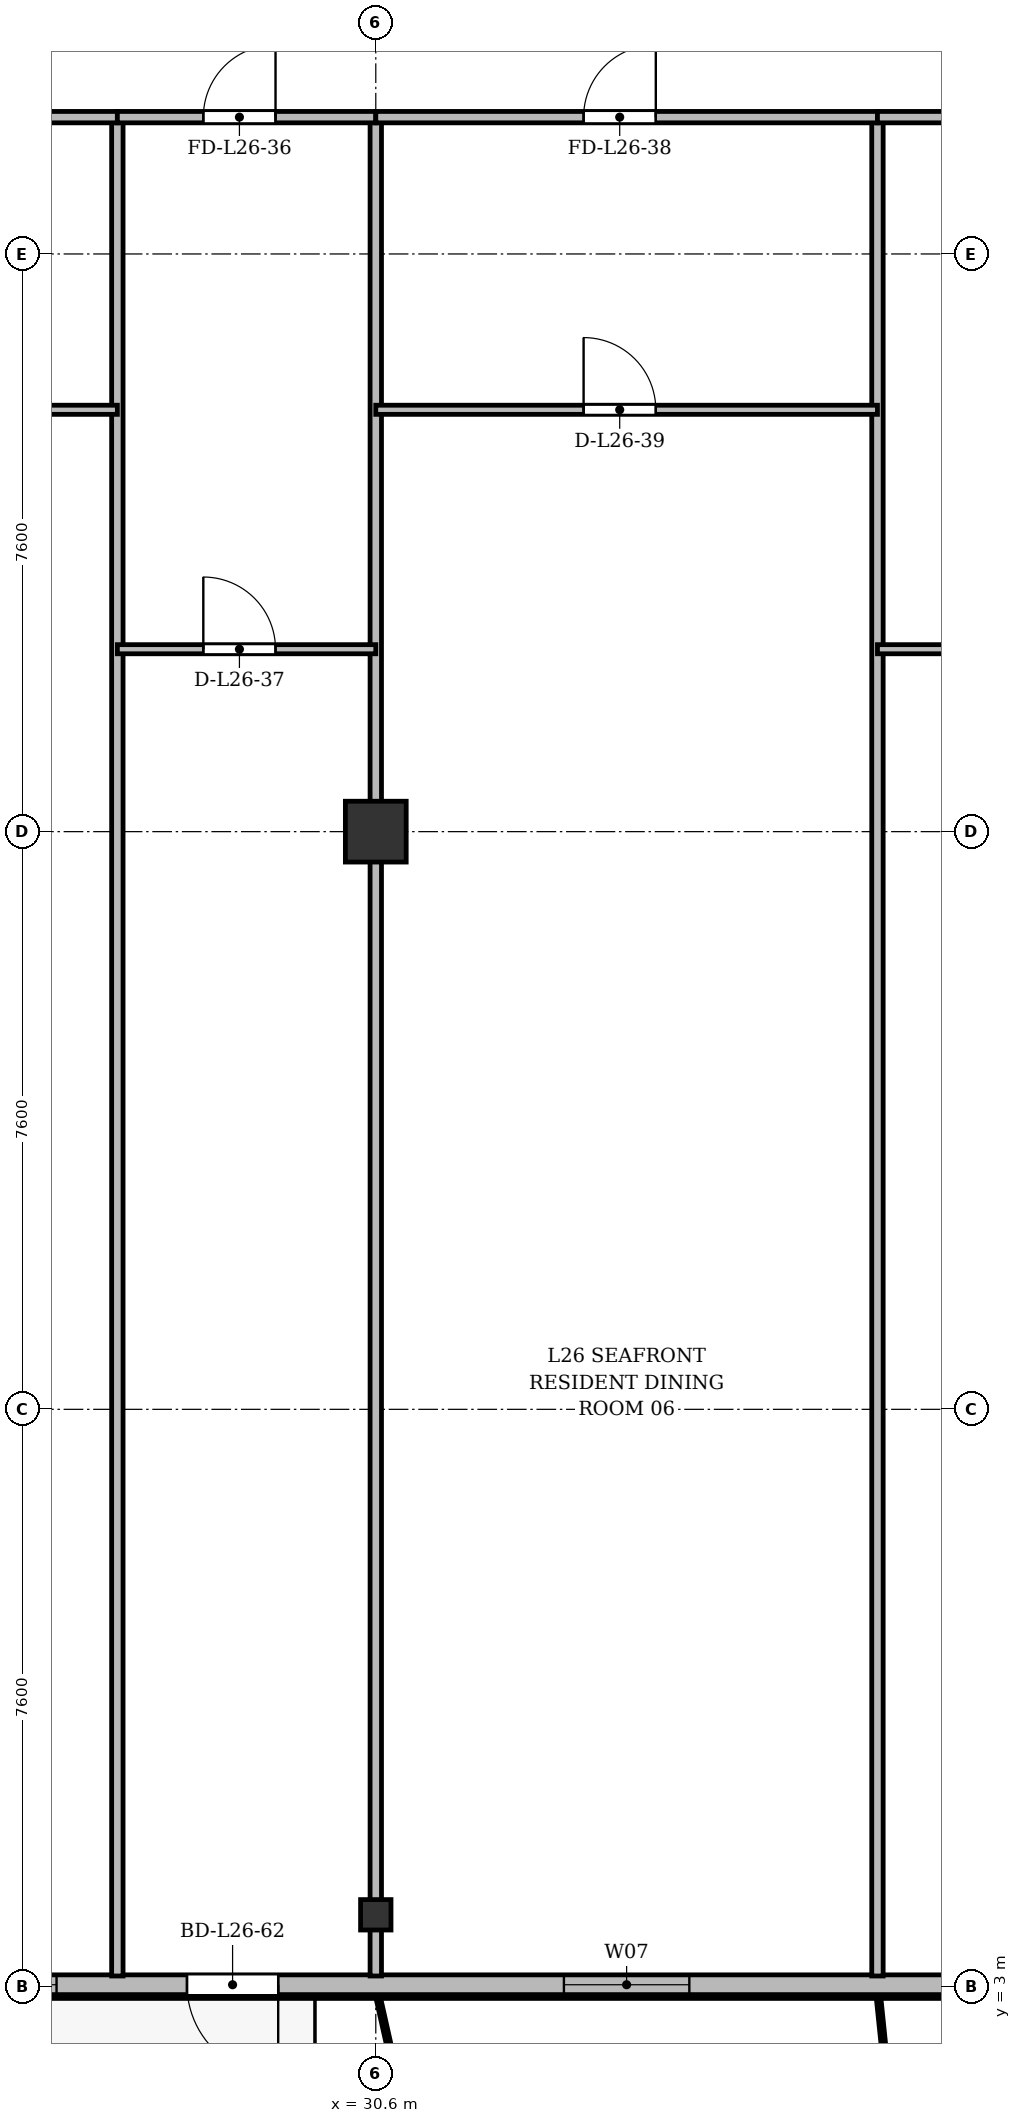
"""IFC4 building model, lengths in metres.
Left out: names, types, materials, properties, quantities, classifications, styles, units other than length and angle.
Written with IfcOpenShell. Run it as: python <this file> out.ifc"""

import sys

from ifc_helpers import new_model, si_unit, direction, frame, frame_2d, origin, origin_2d, place, context, subcontext, project, spatial, rectangle, i_section, extrude, source, transform, mapped, element, fill, save


model = new_model("IFC4")
c1 = context("Model", 3, precision=1e-05, world=origin(), true_north=direction((0.0, 1.0)))
c2 = subcontext(c1, "Body", "Model", "MODEL_VIEW")
j1 = project(units=[si_unit("LENGTHUNIT", "METRE"), si_unit("PLANEANGLEUNIT", "RADIAN")], contexts=[c1])
p1 = place(None, origin())
s1 = spatial("IfcSite", under=j1, at=p1, CompositionType="ELEMENT")
p2 = place(p1, origin())
s2 = spatial("IfcBuilding", under=s1, at=p2, CompositionType="ELEMENT")
p3 = place(p2, frame((0.0, 0.0, 103.3)))
s3 = spatial("IfcBuildingStorey", under=s2, at=p3, CompositionType="ELEMENT", Elevation=103.3)
m1 = source(origin(), c2, "Body", "SweptSolid", [
    extrude(i_section(OverallWidth=0.4, OverallDepth=0.4, WebThickness=0.022, FlangeThickness=0.035, at=origin_2d()), origin(), (0.0, 0.0, 1.0), 3.6),
])
p4 = place(p3, frame((30.6, 3.95, 0.0), z_axis=(0.0, 0.0, 1.0), x_axis=(1.0, 0.0, 0.0)))
e1 = element("IfcColumn", 1, at=p4, inside=s3, PredefinedType="COLUMN", context=c2, shape_type="MappedRepresentation", body=[
    mapped(m1, transform((0.0, 0.0, 0.0), x_axis=(1.0, 0.0, 0.0), y_axis=(0.0, 1.0, 0.0), z_axis=(0.0, 0.0, 1.0), scale=1.0)),
])
m2 = source(origin(), c2, "Body", "SweptSolid", [
    extrude(rectangle(XDim=0.8, YDim=0.8, at=origin_2d()), origin(), (0.0, 0.0, 1.0), 3.6),
])
p5 = place(p3, frame((30.6, 18.2, 0.0), z_axis=(0.0, 0.0, 1.0), x_axis=(1.0, 0.0, 0.0)))
e2 = element("IfcColumn", 2, at=p5, inside=s3, PredefinedType="COLUMN", context=c2, shape_type="MappedRepresentation", body=[
    mapped(m2, transform((0.0, 0.0, 0.0), x_axis=(1.0, 0.0, 0.0), y_axis=(0.0, 1.0, 0.0), z_axis=(0.0, 0.0, 1.0), scale=1.0)),
])
p6 = place(p3, frame((66.9, 3.03, 0.0), z_axis=(0.0, 0.0, 1.0), x_axis=(-1.0, 0.0, 0.0)))
e3 = element("IfcWall", 3, at=p6, inside=s3, PredefinedType="SOLIDWALL", context=c2, shape_type="SweptSolid", body=[
    extrude(rectangle(XDim=59.4, YDim=0.26, at=frame_2d((29.7, 0.0))), origin(), (0.0, 0.0, 1.0), 3.34),
])
p7 = place(p6, frame((2.25, 0.0, 0.9)))
e4 = element("IfcOpeningElement", 4, at=p7, cuts=e3, PredefinedType="OPENING", context=c2, shape_type="SweptSolid", body=[
    extrude(rectangle(XDim=1.5, YDim=1.75, at=frame_2d((0.75, 0.875))), frame((0.0, 0.14, 0.0), z_axis=(0.0, -1.0, 0.0), x_axis=(1.0, 0.0, 0.0)), (0.0, 0.0, 1.0), 0.28),
])
p8 = place(p6, frame((5.4, 0.0, 0.9)))
e5 = element("IfcOpeningElement", 5, at=p8, cuts=e3, PredefinedType="OPENING", context=c2, shape_type="SweptSolid", body=[
    extrude(rectangle(XDim=2.0, YDim=1.95, at=frame_2d((1.0, 0.975))), frame((0.0, 0.14, 0.0), z_axis=(0.0, -1.0, 0.0), x_axis=(1.0, 0.0, 0.0)), (0.0, 0.0, 1.0), 0.28),
])
p9 = place(p6, frame((9.213, 0.0, 0.0)))
e6 = element("IfcOpeningElement", 6, at=p9, cuts=e3, PredefinedType="OPENING", context=c2, shape_type="SweptSolid", body=[
    extrude(rectangle(XDim=1.2, YDim=2.2, at=frame_2d((0.6, 1.1))), frame((0.0, 0.14, 0.0), z_axis=(0.0, -1.0, 0.0), x_axis=(1.0, 0.0, 0.0)), (0.0, 0.0, 1.0), 0.28),
])
p10 = place(p6, frame((13.0, 0.0, 0.9)))
e7 = element("IfcOpeningElement", 7, at=p10, cuts=e3, PredefinedType="OPENING", context=c2, shape_type="SweptSolid", body=[
    extrude(rectangle(XDim=1.8, YDim=1.8, at=frame_2d((0.9, 0.9))), frame((0.0, 0.14, 0.0), z_axis=(0.0, -1.0, 0.0), x_axis=(1.0, 0.0, 0.0)), (0.0, 0.0, 1.0), 0.28),
])
p11 = place(p6, frame((16.6, 0.0, 0.9)))
e8 = element("IfcOpeningElement", 8, at=p11, cuts=e3, PredefinedType="OPENING", context=c2, shape_type="SweptSolid", body=[
    extrude(rectangle(XDim=2.2, YDim=1.8, at=frame_2d((1.1, 0.9))), frame((0.0, 0.14, 0.0), z_axis=(0.0, -1.0, 0.0), x_axis=(1.0, 0.0, 0.0)), (0.0, 0.0, 1.0), 0.28),
])
p12 = place(p6, frame((20.55, 0.0, 0.9)))
e9 = element("IfcOpeningElement", 9, at=p12, cuts=e3, PredefinedType="OPENING", context=c2, shape_type="SweptSolid", body=[
    extrude(rectangle(XDim=1.5, YDim=1.75, at=frame_2d((0.75, 0.875))), frame((0.0, 0.14, 0.0), z_axis=(0.0, -1.0, 0.0), x_axis=(1.0, 0.0, 0.0)), (0.0, 0.0, 1.0), 0.28),
])
p13 = place(p6, frame((25.4, 0.0, 0.9)))
e10 = element("IfcOpeningElement", 10, at=p13, cuts=e3, PredefinedType="OPENING", context=c2, shape_type="SweptSolid", body=[
    extrude(rectangle(XDim=2.0, YDim=1.95, at=frame_2d((1.0, 0.975))), frame((0.0, 0.14, 0.0), z_axis=(0.0, -1.0, 0.0), x_axis=(1.0, 0.0, 0.0)), (0.0, 0.0, 1.0), 0.28),
])
p14 = place(p6, frame((32.175, 0.0, 0.9)))
e11 = element("IfcOpeningElement", 11, at=p14, cuts=e3, PredefinedType="OPENING", context=c2, shape_type="SweptSolid", body=[
    extrude(rectangle(XDim=1.65, YDim=1.85, at=frame_2d((0.825, 0.925))), frame((0.0, 0.14, 0.0), z_axis=(0.0, -1.0, 0.0), x_axis=(1.0, 0.0, 0.0)), (0.0, 0.0, 1.0), 0.28),
])
p15 = place(p6, frame((37.584, 0.0, 0.0)))
e12 = element("IfcOpeningElement", 12, at=p15, cuts=e3, PredefinedType="OPENING", context=c2, shape_type="SweptSolid", body=[
    extrude(rectangle(XDim=1.2, YDim=2.2, at=frame_2d((0.6, 1.1))), frame((0.0, 0.14, 0.0), z_axis=(0.0, -1.0, 0.0), x_axis=(1.0, 0.0, 0.0)), (0.0, 0.0, 1.0), 0.28),
])
p16 = place(p6, frame((40.5, 0.0, 0.9)))
e13 = element("IfcOpeningElement", 13, at=p16, cuts=e3, PredefinedType="OPENING", context=c2, shape_type="SweptSolid", body=[
    extrude(rectangle(XDim=2.2, YDim=1.8, at=frame_2d((1.1, 0.9))), frame((0.0, 0.14, 0.0), z_axis=(0.0, -1.0, 0.0), x_axis=(1.0, 0.0, 0.0)), (0.0, 0.0, 1.0), 0.28),
])
p17 = place(p6, frame((46.65, 0.0, 0.9)))
e14 = element("IfcOpeningElement", 14, at=p17, cuts=e3, PredefinedType="OPENING", context=c2, shape_type="SweptSolid", body=[
    extrude(rectangle(XDim=1.5, YDim=1.75, at=frame_2d((0.75, 0.875))), frame((0.0, 0.14, 0.0), z_axis=(0.0, -1.0, 0.0), x_axis=(1.0, 0.0, 0.0)), (0.0, 0.0, 1.0), 0.28),
])
p18 = place(p6, frame((55.817, 0.0, 0.0)))
e15 = element("IfcOpeningElement", 15, at=p18, cuts=e3, PredefinedType="OPENING", context=c2, shape_type="SweptSolid", body=[
    extrude(rectangle(XDim=1.2, YDim=2.2, at=frame_2d((0.6, 1.1))), frame((0.0, 0.14, 0.0), z_axis=(0.0, -1.0, 0.0), x_axis=(1.0, 0.0, 0.0)), (0.0, 0.0, 1.0), 0.28),
])
p19 = place(p3, frame((27.2, 3.145, 0.0), z_axis=(0.0, 0.0, 1.0), x_axis=(0.0, 1.0, 0.0)))
e16 = element("IfcWall", 16, at=p19, inside=s3, PredefinedType="PARTITIONING", context=c2, shape_type="SweptSolid", body=[
    extrude(rectangle(XDim=24.455, YDim=0.15, at=frame_2d((12.228, 0.0))), origin(), (0.0, 0.0, 1.0), 2.752),
])
p20 = place(p3, frame((30.6, 3.145, 0.0), z_axis=(0.0, 0.0, 1.0), x_axis=(0.0, 1.0, 0.0)))
e17 = element("IfcWall", 17, at=p20, inside=s3, PredefinedType="PARTITIONING", context=c2, shape_type="SweptSolid", body=[
    extrude(rectangle(XDim=24.455, YDim=0.15, at=frame_2d((12.228, 0.0))), origin(), (0.0, 0.0, 1.0), 2.84),
])
p21 = place(p3, frame((37.2, 3.145, 0.0), z_axis=(0.0, 0.0, 1.0), x_axis=(0.0, 1.0, 0.0)))
e18 = element("IfcWall", 18, at=p21, inside=s3, PredefinedType="PARTITIONING", context=c2, shape_type="SweptSolid", body=[
    extrude(rectangle(XDim=24.455, YDim=0.15, at=frame_2d((12.228, 0.0))), origin(), (0.0, 0.0, 1.0), 2.752),
])
p22 = place(p3, frame((23.4, 27.6, 0.0), z_axis=(0.0, 0.0, 1.0), x_axis=(1.0, 0.0, 0.0)))
e19 = element("IfcWall", 19, at=p22, inside=s3, PredefinedType="PARTITIONING", context=c2, shape_type="SweptSolid", body=[
    extrude(rectangle(XDim=3.8, YDim=0.15, at=frame_2d((1.9, 0.0))), origin(), (0.0, 0.0, 1.0), 2.84),
])
p23 = place(p22, frame((1.33, 0.0, 0.0)))
e20 = element("IfcOpeningElement", 20, at=p23, cuts=e19, PredefinedType="OPENING", context=c2, shape_type="SweptSolid", body=[
    extrude(rectangle(XDim=0.95, YDim=2.15, at=frame_2d((0.475, 1.075))), frame((0.0, 0.085, 0.0), z_axis=(0.0, -1.0, 0.0), x_axis=(1.0, 0.0, 0.0)), (0.0, 0.0, 1.0), 0.17),
])
p24 = place(p3, frame((23.4, 23.75, 0.0), z_axis=(0.0, 0.0, 1.0), x_axis=(1.0, 0.0, 0.0)))
e21 = element("IfcWall", 21, at=p24, inside=s3, PredefinedType="PARTITIONING", context=c2, shape_type="SweptSolid", body=[
    extrude(rectangle(XDim=3.8, YDim=0.12, at=frame_2d((1.9, 0.0))), origin(), (0.0, 0.0, 1.0), 2.84),
])
p25 = place(p24, frame((1.33, 0.0, 0.0)))
e22 = element("IfcOpeningElement", 22, at=p25, cuts=e21, PredefinedType="OPENING", context=c2, shape_type="SweptSolid", body=[
    extrude(rectangle(XDim=0.95, YDim=2.15, at=frame_2d((0.475, 1.075))), frame((0.0, 0.07, 0.0), z_axis=(0.0, -1.0, 0.0), x_axis=(1.0, 0.0, 0.0)), (0.0, 0.0, 1.0), 0.14),
])
p26 = place(p3, frame((27.2, 27.6, 0.0), z_axis=(0.0, 0.0, 1.0), x_axis=(1.0, 0.0, 0.0)))
e23 = element("IfcWall", 23, at=p26, inside=s3, PredefinedType="PARTITIONING", context=c2, shape_type="SweptSolid", body=[
    extrude(rectangle(XDim=3.4, YDim=0.15, at=frame_2d((1.7, 0.0))), origin(), (0.0, 0.0, 1.0), 2.84),
])
p27 = place(p26, frame((1.131, 0.0, 0.0)))
e24 = element("IfcOpeningElement", 24, at=p27, cuts=e23, PredefinedType="OPENING", context=c2, shape_type="SweptSolid", body=[
    extrude(rectangle(XDim=0.95, YDim=2.15, at=frame_2d((0.475, 1.075))), frame((0.0, 0.085, 0.0), z_axis=(0.0, -1.0, 0.0), x_axis=(1.0, 0.0, 0.0)), (0.0, 0.0, 1.0), 0.17),
])
p28 = place(p3, frame((27.2, 20.6, 0.0), z_axis=(0.0, 0.0, 1.0), x_axis=(1.0, 0.0, 0.0)))
e25 = element("IfcWall", 25, at=p28, inside=s3, PredefinedType="PARTITIONING", context=c2, shape_type="SweptSolid", body=[
    extrude(rectangle(XDim=3.4, YDim=0.12, at=frame_2d((1.7, 0.0))), origin(), (0.0, 0.0, 1.0), 2.84),
])
p29 = place(p28, frame((1.131, 0.0, 0.0)))
e26 = element("IfcOpeningElement", 26, at=p29, cuts=e25, PredefinedType="OPENING", context=c2, shape_type="SweptSolid", body=[
    extrude(rectangle(XDim=0.95, YDim=2.15, at=frame_2d((0.475, 1.075))), frame((0.0, 0.07, 0.0), z_axis=(0.0, -1.0, 0.0), x_axis=(1.0, 0.0, 0.0)), (0.0, 0.0, 1.0), 0.14),
])
p30 = place(p3, frame((30.6, 27.6, 0.0), z_axis=(0.0, 0.0, 1.0), x_axis=(1.0, 0.0, 0.0)))
e27 = element("IfcWall", 27, at=p30, inside=s3, PredefinedType="PARTITIONING", context=c2, shape_type="SweptSolid", body=[
    extrude(rectangle(XDim=6.6, YDim=0.15, at=frame_2d((3.3, 0.0))), origin(), (0.0, 0.0, 1.0), 2.84),
])
p31 = place(p30, frame((2.734, 0.0, 0.0)))
e28 = element("IfcOpeningElement", 28, at=p31, cuts=e27, PredefinedType="OPENING", context=c2, shape_type="SweptSolid", body=[
    extrude(rectangle(XDim=0.95, YDim=2.15, at=frame_2d((0.475, 1.075))), frame((0.0, 0.085, 0.0), z_axis=(0.0, -1.0, 0.0), x_axis=(1.0, 0.0, 0.0)), (0.0, 0.0, 1.0), 0.17),
])
p32 = place(p3, frame((30.6, 23.75, 0.0), z_axis=(0.0, 0.0, 1.0), x_axis=(1.0, 0.0, 0.0)))
e29 = element("IfcWall", 29, at=p32, inside=s3, PredefinedType="PARTITIONING", context=c2, shape_type="SweptSolid", body=[
    extrude(rectangle(XDim=6.6, YDim=0.12, at=frame_2d((3.3, 0.0))), origin(), (0.0, 0.0, 1.0), 2.84),
])
p33 = place(p32, frame((2.734, 0.0, 0.0)))
e30 = element("IfcOpeningElement", 30, at=p33, cuts=e29, PredefinedType="OPENING", context=c2, shape_type="SweptSolid", body=[
    extrude(rectangle(XDim=0.95, YDim=2.15, at=frame_2d((0.475, 1.075))), frame((0.0, 0.07, 0.0), z_axis=(0.0, -1.0, 0.0), x_axis=(1.0, 0.0, 0.0)), (0.0, 0.0, 1.0), 0.14),
])
p34 = place(p3, frame((37.2, 27.6, 0.0), z_axis=(0.0, 0.0, 1.0), x_axis=(1.0, 0.0, 0.0)))
e31 = element("IfcWall", 31, at=p34, inside=s3, PredefinedType="PARTITIONING", context=c2, shape_type="SweptSolid", body=[
    extrude(rectangle(XDim=6.6, YDim=0.15, at=frame_2d((3.3, 0.0))), origin(), (0.0, 0.0, 1.0), 2.84),
])
p35 = place(p34, frame((2.734, 0.0, 0.0)))
e32 = element("IfcOpeningElement", 32, at=p35, cuts=e31, PredefinedType="OPENING", context=c2, shape_type="SweptSolid", body=[
    extrude(rectangle(XDim=0.95, YDim=2.15, at=frame_2d((0.475, 1.075))), frame((0.0, 0.085, 0.0), z_axis=(0.0, -1.0, 0.0), x_axis=(1.0, 0.0, 0.0)), (0.0, 0.0, 1.0), 0.17),
])
p36 = place(p3, frame((37.2, 20.6, 0.0), z_axis=(0.0, 0.0, 1.0), x_axis=(1.0, 0.0, 0.0)))
e33 = element("IfcWall", 33, at=p36, inside=s3, PredefinedType="PARTITIONING", context=c2, shape_type="SweptSolid", body=[
    extrude(rectangle(XDim=6.6, YDim=0.12, at=frame_2d((3.3, 0.0))), origin(), (0.0, 0.0, 1.0), 2.84),
])
p37 = place(p36, frame((2.734, 0.0, 0.0)))
e34 = element("IfcOpeningElement", 34, at=p37, cuts=e33, PredefinedType="OPENING", context=c2, shape_type="SweptSolid", body=[
    extrude(rectangle(XDim=0.95, YDim=2.15, at=frame_2d((0.475, 1.075))), frame((0.0, 0.07, 0.0), z_axis=(0.0, -1.0, 0.0), x_axis=(1.0, 0.0, 0.0)), (0.0, 0.0, 1.0), 0.14),
])
m3 = source(origin(), c2, "Body", "SweptSolid", [
    extrude(rectangle(XDim=1.65, YDim=1.85, at=frame_2d((0.825, 0.925))), frame((0.0, 0.03, 0.0), z_axis=(0.0, -1.0, 0.0), x_axis=(1.0, 0.0, 0.0)), (0.0, 0.0, 1.0), 0.06),
])
p38 = place(p14, origin())
e35 = element("IfcWindow", 35, at=p38, inside=s3, PartitioningType="SINGLE_PANEL", PredefinedType="WINDOW", context=c2, shape_type="MappedRepresentation", body=[
    mapped(m3, transform((0.0, 0.0, 0.0), x_axis=(1.0, 0.0, 0.0), y_axis=(0.0, 1.0, 0.0), z_axis=(0.0, 0.0, 1.0), scale=1.0)),
])
fill(e11, e35)
m4 = source(origin(), c2, "Body", "SweptSolid", [
    extrude(rectangle(XDim=1.2, YDim=2.2, at=frame_2d((0.6, 1.1))), frame((0.0, 0.025, 0.0), z_axis=(0.0, -1.0, 0.0), x_axis=(1.0, 0.0, 0.0)), (0.0, 0.0, 1.0), 0.05),
])
p39 = place(p15, origin())
e36 = element("IfcDoor", 36, at=p39, inside=s3, OperationType="SINGLE_SWING_LEFT", PredefinedType="DOOR", context=c2, shape_type="MappedRepresentation", body=[
    mapped(m4, transform((0.0, 0.0, 0.0), x_axis=(1.0, 0.0, 0.0), y_axis=(0.0, 1.0, 0.0), z_axis=(0.0, 0.0, 1.0), scale=1.0)),
])
fill(e12, e36)
m5 = source(origin(), c2, "Body", "SweptSolid", [
    extrude(rectangle(XDim=2.2, YDim=1.8, at=frame_2d((1.1, 0.9))), frame((0.0, 0.03, 0.0), z_axis=(0.0, -1.0, 0.0), x_axis=(1.0, 0.0, 0.0)), (0.0, 0.0, 1.0), 0.06),
])
p40 = place(p16, origin())
e37 = element("IfcWindow", 37, at=p40, inside=s3, PartitioningType="SINGLE_PANEL", PredefinedType="WINDOW", context=c2, shape_type="MappedRepresentation", body=[
    mapped(m5, transform((0.0, 0.0, 0.0), x_axis=(1.0, 0.0, 0.0), y_axis=(0.0, 1.0, 0.0), z_axis=(0.0, 0.0, 1.0), scale=1.0)),
])
fill(e13, e37)
m6 = source(origin(), c2, "Body", "SweptSolid", [
    extrude(rectangle(XDim=0.95, YDim=2.15, at=frame_2d((0.475, 1.075))), frame((0.0, 0.025, 0.0), z_axis=(0.0, -1.0, 0.0), x_axis=(1.0, 0.0, 0.0)), (0.0, 0.0, 1.0), 0.05),
])
p41 = place(p27, origin())
e38 = element("IfcDoor", 38, at=p41, inside=s3, OperationType="SINGLE_SWING_RIGHT", PredefinedType="DOOR", context=c2, shape_type="MappedRepresentation", body=[
    mapped(m6, transform((0.0, 0.0, 0.0), x_axis=(1.0, 0.0, 0.0), y_axis=(0.0, 1.0, 0.0), z_axis=(0.0, 0.0, 1.0), scale=1.0)),
])
fill(e24, e38)
p42 = place(p29, origin())
e39 = element("IfcDoor", 39, at=p42, inside=s3, OperationType="SINGLE_SWING_LEFT", PredefinedType="DOOR", context=c2, shape_type="MappedRepresentation", body=[
    mapped(m6, transform((0.0, 0.0, 0.0), x_axis=(1.0, 0.0, 0.0), y_axis=(0.0, 1.0, 0.0), z_axis=(0.0, 0.0, 1.0), scale=1.0)),
])
fill(e26, e39)
p43 = place(p31, origin())
e40 = element("IfcDoor", 40, at=p43, inside=s3, OperationType="SINGLE_SWING_RIGHT", PredefinedType="DOOR", context=c2, shape_type="MappedRepresentation", body=[
    mapped(m6, transform((0.0, 0.0, 0.0), x_axis=(1.0, 0.0, 0.0), y_axis=(0.0, 1.0, 0.0), z_axis=(0.0, 0.0, 1.0), scale=1.0)),
])
fill(e28, e40)
p44 = place(p33, origin())
e41 = element("IfcDoor", 41, at=p44, inside=s3, OperationType="SINGLE_SWING_LEFT", PredefinedType="DOOR", context=c2, shape_type="MappedRepresentation", body=[
    mapped(m6, transform((0.0, 0.0, 0.0), x_axis=(1.0, 0.0, 0.0), y_axis=(0.0, 1.0, 0.0), z_axis=(0.0, 0.0, 1.0), scale=1.0)),
])
fill(e30, e41)
save(model, sys.argv[1])
